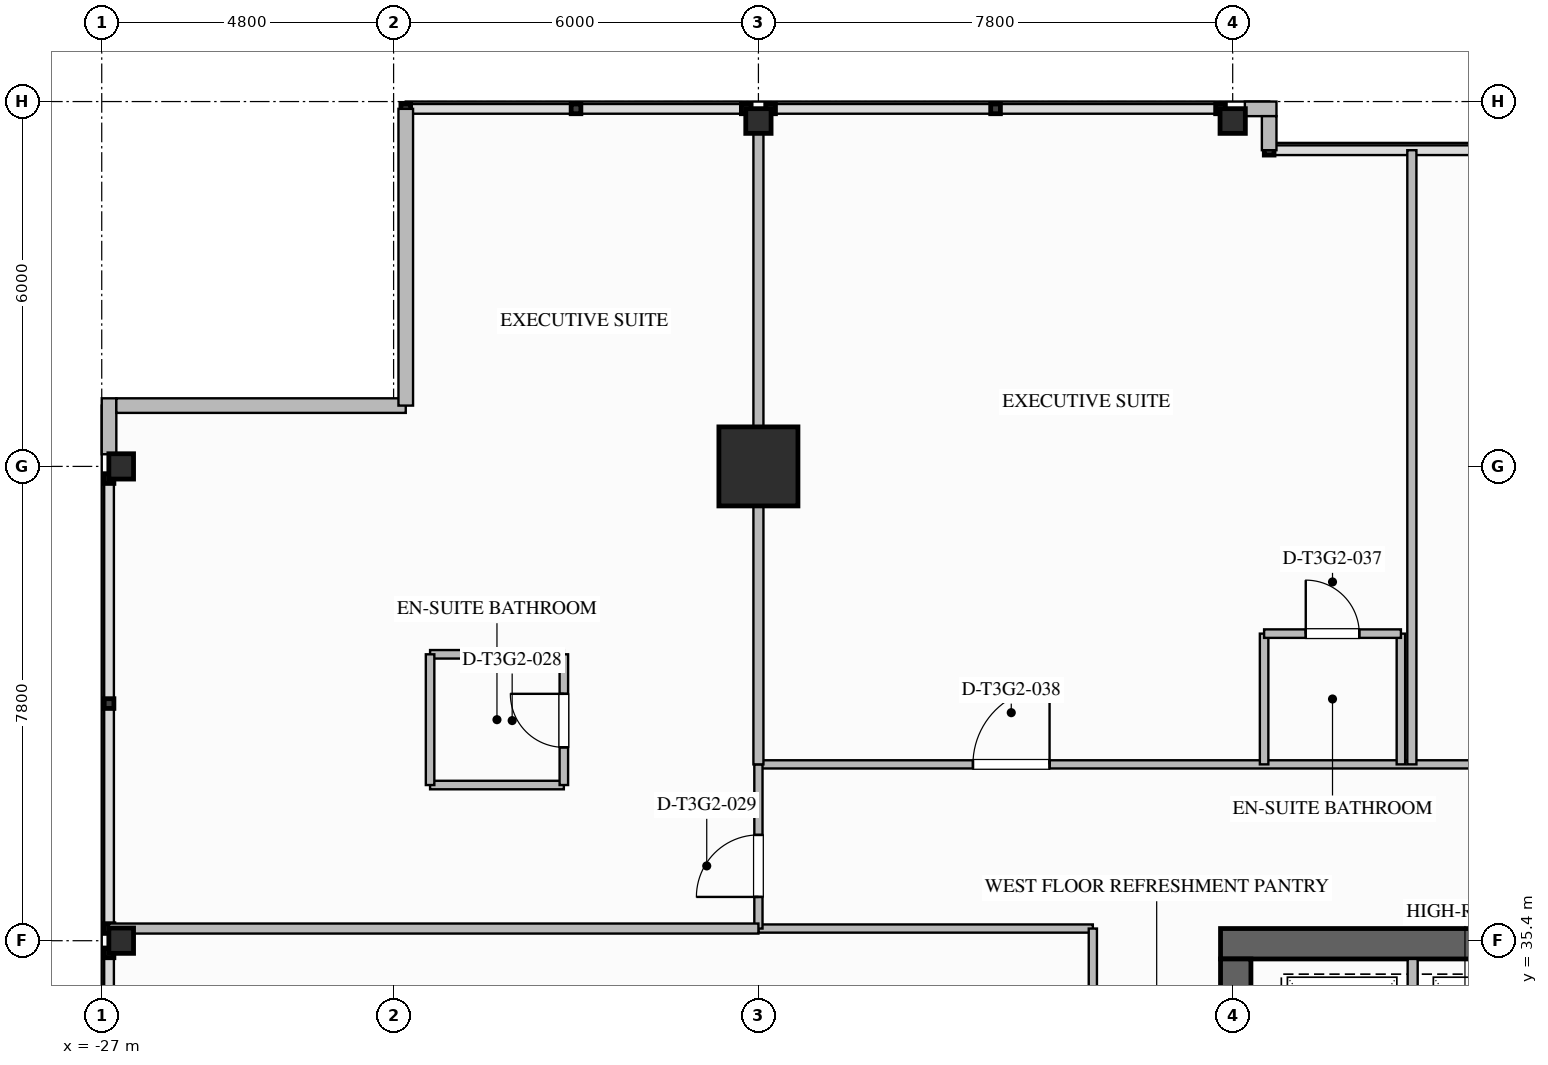
"""IFC4 building model, lengths in metres.
Left out: names, types, materials, properties, quantities, classifications, styles, units other than length and angle.
Written with IfcOpenShell. Run it as: python <this file> out.ifc"""

import sys

from ifc_helpers import new_model, si_unit, direction, frame, frame_2d, origin, origin_2d, place, context, subcontext, project, spatial, rectangle, i_section, extrude, element, fill, save


model = new_model("IFC4")
c1 = context("Model", 3, precision=1e-05, world=origin(), true_north=direction((0.0, 1.0)))
c2 = subcontext(c1, "Body", "Model", "MODEL_VIEW")
j1 = project(units=[si_unit("LENGTHUNIT", "METRE"), si_unit("PLANEANGLEUNIT", "RADIAN")], contexts=[c1])
p1 = place(None, origin())
s1 = spatial("IfcSite", under=j1, at=p1, CompositionType="ELEMENT")
p2 = place(p1, origin())
s2 = spatial("IfcBuilding", under=s1, at=p2, CompositionType="ELEMENT")
p3 = place(p2, frame((0.0, 0.0, 161.05)))
s3 = spatial("IfcBuildingStorey", under=s2, at=p3, CompositionType="ELEMENT", Elevation=161.05)
p4 = place(p3, frame((-8.6, 35.35, 0.0), z_axis=(0.0, 0.0, 1.0), x_axis=(1.0, 0.0, 0.0)))
e1 = element("IfcWall", 1, at=p4, inside=s3, PredefinedType="SHEAR", context=c2, shape_type="SweptSolid", body=[
    extrude(rectangle(XDim=17.2, YDim=0.5, at=frame_2d((8.6, 0.0))), origin(), (0.0, 0.0, 1.0), 3.55),
])
p5 = place(p3, frame((-8.35, 18.9, 0.0), z_axis=(0.0, 0.0, 1.0), x_axis=(0.0, 1.0, 0.0)))
e2 = element("IfcWall", 2, at=p5, inside=s3, PredefinedType="SHEAR", context=c2, shape_type="SweptSolid", body=[
    extrude(rectangle(XDim=16.2, YDim=0.5, at=frame_2d((8.1, 0.0))), origin(), (0.0, 0.0, 1.0), 3.55),
])
p6 = place(p5, frame((12.02, 0.0, 0.0)))
e3 = element("IfcOpeningElement", 3, at=p6, cuts=e2, PredefinedType="OPENING", context=c2, shape_type="SweptSolid", body=[
    extrude(rectangle(XDim=1.08, YDim=2.04, at=frame_2d((0.54, 1.02))), frame((0.0, 0.26, 0.0), z_axis=(0.0, -1.0, 0.0), x_axis=(1.0, 0.0, 0.0)), (0.0, 0.0, 1.0), 0.52),
])
p7 = place(p5, frame((4.5, 0.0, 0.0)))
e4 = element("IfcOpeningElement", 4, at=p7, cuts=e2, PredefinedType="OPENING", context=c2, shape_type="SweptSolid", body=[
    extrude(rectangle(XDim=1.08, YDim=2.04, at=frame_2d((0.54, 1.02))), frame((0.0, 0.26, 0.0), z_axis=(0.0, -1.0, 0.0), x_axis=(1.0, 0.0, 0.0)), (0.0, 0.0, 1.0), 0.52),
])
p8 = place(p3, frame((-16.2, 43.2, 0.0), z_axis=(0.0, 0.0, 1.0), x_axis=(1.0, 0.0, 0.0)))
e5 = element("IfcColumn", 5, at=p8, inside=s3, PredefinedType="COLUMN", context=c2, shape_type="SweptSolid", body=[
    extrude(rectangle(XDim=1.3, YDim=1.3, at=origin_2d()), origin(), (0.0, 0.0, 1.0), 3.55),
])
for number, where, z_axis, x_axis in (
    (6, (-26.68, 35.4, 0.0), (0.0, 0.0, 1.0), (1.0, 0.0, 0.0)),
    (7, (-26.68, 43.2, 0.0), (0.0, 0.0, 1.0), (1.0, 0.0, 0.0)),
    (8, (-16.2, 48.88, 0.0), (0.0, 0.0, 1.0), (0.0, 1.0, 0.0)),
    (9, (-8.4, 48.88, 0.0), (0.0, 0.0, 1.0), (0.0, 1.0, 0.0)),
):
    element("IfcColumn", number, at=place(p3, frame(where, z_axis=z_axis, x_axis=x_axis)), inside=s3, PredefinedType="COLUMN", context=c2, shape_type="SweptSolid", body=[
        extrude(i_section(OverallWidth=0.406, OverallDepth=0.416, WebThickness=0.03, FlangeThickness=0.048, FilletRadius=0.028, at=origin_2d()), origin(), (0.0, 0.0, 1.0), 3.547),
    ])
p9 = place(p3, frame((-26.88, 43.4, 0.0), z_axis=(0.0, 0.0, 1.0), x_axis=(0.0, 1.0, 0.0)))
e10 = element("IfcWall", 10, at=p9, inside=s3, PredefinedType="STANDARD", context=c2, shape_type="SweptSolid", body=[
    extrude(rectangle(XDim=0.92, YDim=0.24, at=frame_2d((0.46, 0.0))), origin(), (0.0, 0.0, 1.0), 3.29),
])
p10 = place(p3, frame((-8.2, 49.08, 0.0), z_axis=(0.0, 0.0, 1.0), x_axis=(1.0, 0.0, 0.0)))
e11 = element("IfcWall", 11, at=p10, inside=s3, PredefinedType="STANDARD", context=c2, shape_type="SweptSolid", body=[
    extrude(rectangle(XDim=0.52, YDim=0.24, at=frame_2d((0.26, 0.0))), origin(), (0.0, 0.0, 1.0), 3.29),
])
p11 = place(p3, frame((-26.76, 44.2, 0.0), z_axis=(0.0, 0.0, 1.0), x_axis=(1.0, 0.0, 0.0)))
e12 = element("IfcWall", 12, at=p11, inside=s3, PredefinedType="STANDARD", context=c2, shape_type="SweptSolid", body=[
    extrude(rectangle(XDim=4.76, YDim=0.24, at=frame_2d((2.38, 0.0))), origin(), (0.0, 0.0, 1.0), 3.29),
])
p12 = place(p3, frame((-22.0, 44.2, 0.0), z_axis=(0.0, 0.0, 1.0), x_axis=(0.0, 1.0, 0.0)))
e13 = element("IfcWall", 13, at=p12, inside=s3, PredefinedType="STANDARD", context=c2, shape_type="SweptSolid", body=[
    extrude(rectangle(XDim=4.88, YDim=0.24, at=frame_2d((2.44, 0.0))), origin(), (0.0, 0.0, 1.0), 3.29),
])
p13 = place(p3, frame((-7.8, 48.96, 0.0), z_axis=(0.0, 0.0, 1.0), x_axis=(0.0, -1.0, 0.0)))
e14 = element("IfcWall", 14, at=p13, inside=s3, PredefinedType="STANDARD", context=c2, shape_type="SweptSolid", body=[
    extrude(rectangle(XDim=0.56, YDim=0.24, at=frame_2d((0.28, 0.0))), origin(), (0.0, 0.0, 1.0), 3.29),
])
p14 = place(p3, frame((-5.44, 32.22, 0.0), z_axis=(0.0, 0.0, 1.0), x_axis=(0.0, 1.0, 0.0)))
e15 = element("IfcWall", 15, at=p14, inside=s3, PredefinedType="PARTITIONING", context=c2, shape_type="SweptSolid", body=[
    extrude(rectangle(XDim=2.88, YDim=0.165, at=frame_2d((1.44, 0.0))), origin(), (0.0, 0.0, 1.0), 3.29),
])
p15 = place(p3, frame((-16.2, 35.6, 0.0), z_axis=(0.0, 0.0, 1.0), x_axis=(1.0, 0.0, 0.0)))
e16 = element("IfcWall", 16, at=p15, inside=s3, PredefinedType="PARTITIONING", context=c2, shape_type="SweptSolid", body=[
    extrude(rectangle(XDim=5.5, YDim=0.135, at=frame_2d((2.75, 0.0))), origin(), (0.0, 0.0, 1.0), 2.667),
])
p16 = place(p3, frame((-16.2, 38.3, 0.0), z_axis=(0.0, 0.0, 1.0), x_axis=(1.0, 0.0, 0.0)))
e17 = element("IfcWall", 17, at=p16, inside=s3, PredefinedType="PARTITIONING", context=c2, shape_type="SweptSolid", body=[
    extrude(rectangle(XDim=24.8, YDim=0.135, at=frame_2d((12.4, 0.0))), origin(), (0.0, 0.0, 1.0), 3.29),
])
p17 = place(p16, frame((3.528, 0.0, 0.0)))
e18 = element("IfcOpeningElement", 18, at=p17, cuts=e17, PredefinedType="OPENING", context=c2, shape_type="SweptSolid", body=[
    extrude(rectangle(XDim=1.26, YDim=2.2, at=frame_2d((0.63, 1.1))), frame((0.0, 0.077, 0.0), z_axis=(0.0, -1.0, 0.0), x_axis=(1.0, 0.0, 0.0)), (0.0, 0.0, 1.0), 0.155),
])
p18 = place(p16, frame((15.928, 0.0, 0.0)))
e19 = element("IfcOpeningElement", 19, at=p18, cuts=e17, PredefinedType="OPENING", context=c2, shape_type="SweptSolid", body=[
    extrude(rectangle(XDim=1.26, YDim=2.2, at=frame_2d((0.63, 1.1))), frame((0.0, 0.077, 0.0), z_axis=(0.0, -1.0, 0.0), x_axis=(1.0, 0.0, 0.0)), (0.0, 0.0, 1.0), 0.155),
])
p19 = place(p3, frame((-10.7, 18.4, 0.0), z_axis=(0.0, 0.0, 1.0), x_axis=(0.0, 1.0, 0.0)))
e20 = element("IfcWall", 20, at=p19, inside=s3, PredefinedType="PARTITIONING", context=c2, shape_type="SweptSolid", body=[
    extrude(rectangle(XDim=17.2, YDim=0.135, at=frame_2d((8.6, 0.0))), origin(), (0.0, 0.0, 1.0), 3.29),
])
p20 = place(p19, frame((4.255, 0.0, 0.0)))
e21 = element("IfcOpeningElement", 21, at=p20, cuts=e20, PredefinedType="OPENING", context=c2, shape_type="SweptSolid", body=[
    extrude(rectangle(XDim=1.26, YDim=2.2, at=frame_2d((0.63, 1.1))), frame((0.0, 0.077, 0.0), z_axis=(0.0, -1.0, 0.0), x_axis=(1.0, 0.0, 0.0)), (0.0, 0.0, 1.0), 0.155),
])
p21 = place(p19, frame((10.59, 0.0, 0.0)))
e22 = element("IfcOpeningElement", 22, at=p21, cuts=e20, PredefinedType="OPENING", context=c2, shape_type="SweptSolid", body=[
    extrude(rectangle(XDim=1.02, YDim=2.15, at=frame_2d((0.51, 1.075))), frame((0.0, 0.077, 0.0), z_axis=(0.0, -1.0, 0.0), x_axis=(1.0, 0.0, 0.0)), (0.0, 0.0, 1.0), 0.155),
])
p22 = place(p3, frame((-16.2, 35.6, 0.0), z_axis=(0.0, 0.0, 1.0), x_axis=(0.0, 1.0, 0.0)))
e23 = element("IfcWall", 23, at=p22, inside=s3, PredefinedType="PARTITIONING", context=c2, shape_type="SweptSolid", body=[
    extrude(rectangle(XDim=2.7, YDim=0.135, at=frame_2d((1.35, 0.0))), origin(), (0.0, 0.0, 1.0), 2.58),
])
p23 = place(p22, frame((0.52, 0.0, 0.0)))
e24 = element("IfcOpeningElement", 24, at=p23, cuts=e23, PredefinedType="OPENING", context=c2, shape_type="SweptSolid", body=[
    extrude(rectangle(XDim=1.02, YDim=2.15, at=frame_2d((0.51, 1.075))), frame((0.0, 0.077, 0.0), z_axis=(0.0, -1.0, 0.0), x_axis=(1.0, 0.0, 0.0)), (0.0, 0.0, 1.0), 0.155),
])
p24 = place(p3, frame((-16.2, 38.3, 0.0), z_axis=(0.0, 0.0, 1.0), x_axis=(0.0, 1.0, 0.0)))
e25 = element("IfcWall", 25, at=p24, inside=s3, PredefinedType="PARTITIONING", context=c2, shape_type="SweptSolid", body=[
    extrude(rectangle(XDim=10.78, YDim=0.165, at=frame_2d((5.39, 0.0))), origin(), (0.0, 0.0, 1.0), 2.58),
])
p25 = place(p3, frame((-26.88, 35.6, 0.0), z_axis=(0.0, 0.0, 1.0), x_axis=(1.0, 0.0, 0.0)))
e26 = element("IfcWall", 26, at=p25, inside=s3, PredefinedType="PARTITIONING", context=c2, shape_type="SweptSolid", body=[
    extrude(rectangle(XDim=10.68, YDim=0.165, at=frame_2d((5.34, 0.0))), origin(), (0.0, 0.0, 1.0), 2.58),
])
for number, where, z_axis, x_axis in (
    (27, (-21.6, 37.96, 0.0), (0.0, 0.0, 1.0), (1.0, 0.0, 0.0)),
    (28, (-21.6, 40.11, 0.0), (0.0, 0.0, 1.0), (1.0, 0.0, 0.0)),
):
    element("IfcWall", number, at=place(p3, frame(where, z_axis=z_axis, x_axis=x_axis)), inside=s3, PredefinedType="PLUMBINGWALL", context=c2, shape_type="SweptSolid", body=[
        extrude(rectangle(XDim=2.2, YDim=0.14, at=frame_2d((1.1, 0.0))), origin(), (0.0, 0.0, 1.0), 3.29),
    ])
p26 = place(p3, frame((-21.6, 37.96, 0.0), z_axis=(0.0, 0.0, 1.0), x_axis=(0.0, 1.0, 0.0)))
e29 = element("IfcWall", 29, at=p26, inside=s3, PredefinedType="PLUMBINGWALL", context=c2, shape_type="SweptSolid", body=[
    extrude(rectangle(XDim=2.15, YDim=0.14, at=frame_2d((1.075, 0.0))), origin(), (0.0, 0.0, 1.0), 3.29),
])
p27 = place(p3, frame((-19.4, 37.96, 0.0), z_axis=(0.0, 0.0, 1.0), x_axis=(0.0, 1.0, 0.0)))
e30 = element("IfcWall", 30, at=p27, inside=s3, PredefinedType="PLUMBINGWALL", context=c2, shape_type="SweptSolid", body=[
    extrude(rectangle(XDim=2.15, YDim=0.14, at=frame_2d((1.075, 0.0))), origin(), (0.0, 0.0, 1.0), 3.29),
])
p28 = place(p27, frame((0.62, 0.0, 0.0)))
e31 = element("IfcOpeningElement", 31, at=p28, cuts=e30, PredefinedType="OPENING", context=c2, shape_type="SweptSolid", body=[
    extrude(rectangle(XDim=0.88, YDim=2.1, at=frame_2d((0.44, 1.05))), frame((0.0, 0.08, 0.0), z_axis=(0.0, -1.0, 0.0), x_axis=(1.0, 0.0, 0.0)), (0.0, 0.0, 1.0), 0.16),
])
for number, where, z_axis, x_axis in (
    (32, (-7.883, 38.3, 0.0), (0.0, 0.0, 1.0), (0.0, 1.0, 0.0)),
    (33, (-5.633, 38.3, 0.0), (0.0, 0.0, 1.0), (0.0, 1.0, 0.0)),
):
    element("IfcWall", number, at=place(p3, frame(where, z_axis=z_axis, x_axis=x_axis)), inside=s3, PredefinedType="PLUMBINGWALL", context=c2, shape_type="SweptSolid", body=[
        extrude(rectangle(XDim=2.15, YDim=0.14, at=frame_2d((1.075, 0.0))), origin(), (0.0, 0.0, 1.0), 3.29),
    ])
p29 = place(p3, frame((-7.883, 40.45, 0.0), z_axis=(0.0, 0.0, 1.0), x_axis=(1.0, 0.0, 0.0)))
e34 = element("IfcWall", 34, at=p29, inside=s3, PredefinedType="PLUMBINGWALL", context=c2, shape_type="SweptSolid", body=[
    extrude(rectangle(XDim=2.25, YDim=0.14, at=frame_2d((1.125, 0.0))), origin(), (0.0, 0.0, 1.0), 3.29),
])
p30 = place(p29, frame((0.685, 0.0, 0.0)))
e35 = element("IfcOpeningElement", 35, at=p30, cuts=e34, PredefinedType="OPENING", context=c2, shape_type="SweptSolid", body=[
    extrude(rectangle(XDim=0.88, YDim=2.1, at=frame_2d((0.44, 1.05))), frame((0.0, 0.08, 0.0), z_axis=(0.0, -1.0, 0.0), x_axis=(1.0, 0.0, 0.0)), (0.0, 0.0, 1.0), 0.16),
])
p31 = place(p3, frame((-5.453, 38.3, 0.0), z_axis=(0.0, 0.0, 1.0), x_axis=(0.0, 1.0, 0.0)))
e36 = element("IfcWall", 36, at=p31, inside=s3, PredefinedType="PARTITIONING", context=c2, shape_type="SweptSolid", body=[
    extrude(rectangle(XDim=10.1, YDim=0.15, at=frame_2d((5.05, 0.0))), origin(), (0.0, 0.0, 1.0), 3.29),
])
p32 = place(p28, origin())
e37 = element("IfcDoor", 37, at=p32, inside=s3, OperationType="SINGLE_SWING_RIGHT", PredefinedType="DOOR", context=c2, shape_type="SweptSolid", body=[
    extrude(rectangle(XDim=0.88, YDim=2.1, at=frame_2d((0.44, 1.05))), frame((0.0, 0.025, 0.0), z_axis=(0.0, -1.0, 0.0), x_axis=(1.0, 0.0, 0.0)), (0.0, 0.0, 1.0), 0.05),
])
fill(e31, e37)
p33 = place(p23, origin())
e38 = element("IfcDoor", 38, at=p33, inside=s3, OperationType="SINGLE_SWING_LEFT", PredefinedType="DOOR", context=c2, shape_type="SweptSolid", body=[
    extrude(rectangle(XDim=1.02, YDim=2.15, at=frame_2d((0.51, 1.075))), frame((0.0, 0.025, 0.0), z_axis=(0.0, -1.0, 0.0), x_axis=(1.0, 0.0, 0.0)), (0.0, 0.0, 1.0), 0.05),
])
fill(e24, e38)
p34 = place(p30, origin())
e39 = element("IfcDoor", 39, at=p34, inside=s3, OperationType="SINGLE_SWING_LEFT", PredefinedType="DOOR", context=c2, shape_type="SweptSolid", body=[
    extrude(rectangle(XDim=0.88, YDim=2.1, at=frame_2d((0.44, 1.05))), frame((0.0, 0.025, 0.0), z_axis=(0.0, -1.0, 0.0), x_axis=(1.0, 0.0, 0.0)), (0.0, 0.0, 1.0), 0.05),
])
fill(e35, e39)
p35 = place(p17, origin())
e40 = element("IfcDoor", 40, at=p35, inside=s3, OperationType="SINGLE_SWING_RIGHT", PredefinedType="DOOR", context=c2, shape_type="SweptSolid", body=[
    extrude(rectangle(XDim=1.26, YDim=2.2, at=frame_2d((0.63, 1.1))), frame((0.0, 0.025, 0.0), z_axis=(0.0, -1.0, 0.0), x_axis=(1.0, 0.0, 0.0)), (0.0, 0.0, 1.0), 0.05),
])
fill(e18, e40)
save(model, sys.argv[1])
